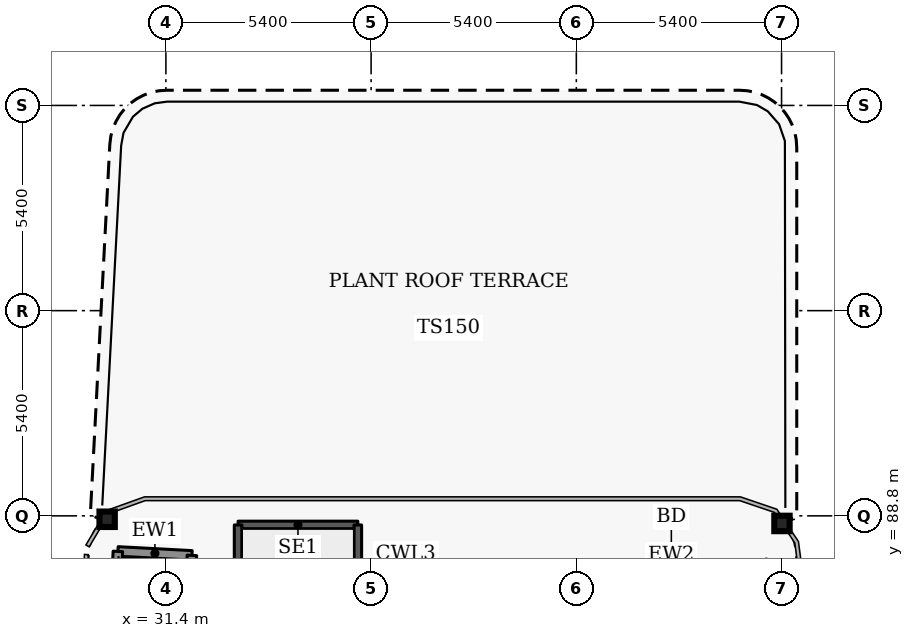
"""IFC4 building model, lengths in metres.
Left out: names, types, materials, properties, quantities, classifications, styles, units other than length and angle.
Written with IfcOpenShell. Run it as: python <this file> out.ifc"""

import sys

from ifc_helpers import new_model, si_unit, direction, frame, frame_2d, origin, origin_2d, place, context, subcontext, project, spatial, rectangle, i_section, extrude, element, save


model = new_model("IFC4")
c1 = context("Model", 3, precision=1e-05, world=origin(), true_north=direction((0.0, 1.0)))
c2 = subcontext(c1, "Body", "Model", "MODEL_VIEW")
j1 = project(units=[si_unit("LENGTHUNIT", "METRE"), si_unit("PLANEANGLEUNIT", "RADIAN")], contexts=[c1])
p1 = place(None, origin())
s1 = spatial("IfcSite", under=j1, at=p1, CompositionType="ELEMENT")
p2 = place(p1, origin())
s2 = spatial("IfcBuilding", under=s1, at=p2, CompositionType="ELEMENT")
p3 = place(p2, frame((0.0, 0.0, 216.2)))
s3 = spatial("IfcBuildingStorey", under=s2, at=p3, CompositionType="ELEMENT", Elevation=216.2)
for number, where, z_axis, x_axis in (
    (1, (47.611, 88.6, 0.0), (0.0, 0.0, 1.0), (1.0, 0.0, 0.0)),
    (2, (29.854, 88.71, 0.0), (0.0, 0.0, 1.0), (1.0, 0.0, 0.0)),
):
    element("IfcColumn", number, at=place(p3, frame(where, z_axis=z_axis, x_axis=x_axis)), inside=s3, PredefinedType="COLUMN", context=c2, shape_type="SweptSolid", body=[
        extrude(i_section(OverallWidth=0.404, OverallDepth=0.407, WebThickness=0.027, FlangeThickness=0.044, FilletRadius=0.012, at=origin_2d()), origin(), (0.0, 0.0, 1.0), 3.9),
    ])
p4 = place(p3, frame((30.137, 87.864, 0.0), z_axis=(0.0, 0.0, 1.0), x_axis=(0.998577785791, -0.053314216913, 0.0)))
e3 = element("IfcWall", 3, at=p4, inside=s3, PredefinedType="SOLIDWALL", context=c2, shape_type="SweptSolid", body=[
    extrude(rectangle(XDim=1.951, YDim=0.25, at=frame_2d((0.975, 0.0))), origin(), (0.0, 0.0, 1.0), 3.75),
])
p5 = place(p3, frame((32.085, 87.76, 0.0), z_axis=(0.0, 0.0, 1.0), x_axis=(-0.053729014033, -0.998555553312, 0.0)))
e4 = element("IfcWall", 4, at=p5, inside=s3, PredefinedType="SOLIDWALL", context=c2, shape_type="SweptSolid", body=[
    extrude(rectangle(XDim=0.668, YDim=0.25, at=frame_2d((0.334, 0.0))), origin(), (0.0, 0.0, 1.0), 3.75),
])
p6 = place(p3, frame((27.195, 31.969, 0.0), z_axis=(0.0, 0.0, 1.0), x_axis=(0.052559748861, 0.998617781135, 0.0)))
e5 = element("IfcWall", 5, at=p6, inside=s3, PredefinedType="SOLIDWALL", context=c2, shape_type="SweptSolid", body=[
    extrude(rectangle(XDim=55.972, YDim=0.25, at=frame_2d((27.986, 0.0))), origin(), (0.0, 0.0, 1.0), 3.75),
])
p7 = place(p3, frame((33.3, 88.56, 0.0), z_axis=(0.0, 0.0, 1.0), x_axis=(1.0, 0.0, 0.0)))
e6 = element("IfcWall", 6, at=p7, inside=s3, PredefinedType="SHEAR", context=c2, shape_type="SweptSolid", body=[
    extrude(rectangle(XDim=3.15, YDim=0.2, at=frame_2d((1.575, 0.0))), origin(), (0.0, 0.0, 1.0), 3.9),
])
p8 = place(p3, frame((33.3, 79.4, 0.0), z_axis=(0.0, 0.0, 1.0), x_axis=(0.0, 1.0, 0.0)))
e7 = element("IfcWall", 7, at=p8, inside=s3, PredefinedType="SHEAR", context=c2, shape_type="SweptSolid", body=[
    extrude(rectangle(XDim=9.16, YDim=0.2, at=frame_2d((4.58, 0.0))), origin(), (0.0, 0.0, 1.0), 3.9),
])
p9 = place(p8, frame((0.35, 0.0, 0.0)))
e8 = element("IfcOpeningElement", 8, at=p9, cuts=e7, PredefinedType="OPENING", context=c2, shape_type="SweptSolid", body=[
    extrude(rectangle(XDim=1.1, YDim=2.2, at=frame_2d((0.55, 1.1))), frame((0.0, 0.11, 0.0), z_axis=(0.0, -1.0, 0.0), x_axis=(1.0, 0.0, 0.0)), (0.0, 0.0, 1.0), 0.22),
])
p10 = place(p3, frame((36.45, 79.4, 0.0), z_axis=(0.0, 0.0, 1.0), x_axis=(0.0, 1.0, 0.0)))
e9 = element("IfcWall", 9, at=p10, inside=s3, PredefinedType="SHEAR", context=c2, shape_type="SweptSolid", body=[
    extrude(rectangle(XDim=9.16, YDim=0.2, at=frame_2d((4.58, 0.0))), origin(), (0.0, 0.0, 1.0), 3.9),
])
save(model, sys.argv[1])
